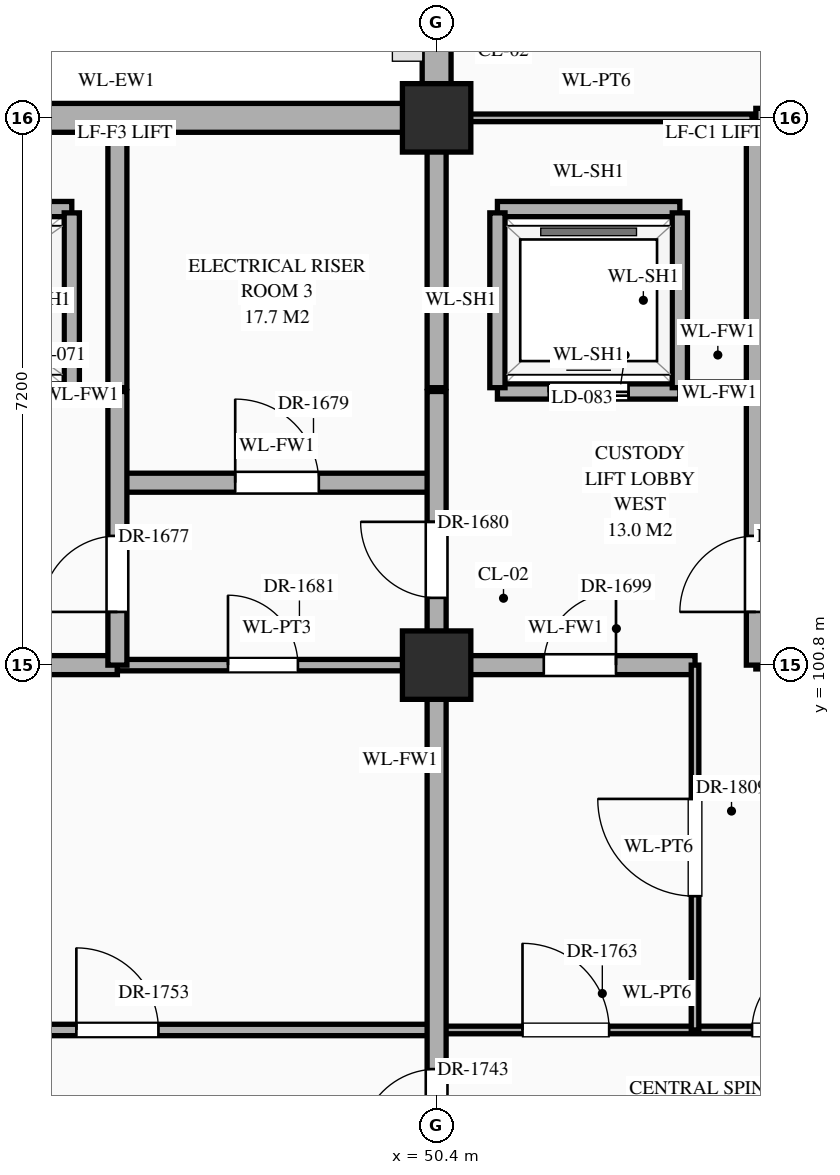
"""IFC4 building model, lengths in metres.
Left out: names, types, materials, properties, quantities, classifications, styles, units other than length and angle.
Written with IfcOpenShell. Run it as: python <this file> out.ifc"""

import sys

from ifc_helpers import new_model, si_unit, direction, frame, frame_2d, origin, origin_2d, place, context, subcontext, project, spatial, rectangle, extrude, element, fill, save


model = new_model("IFC4")
c1 = context("Model", 3, precision=1e-05, world=origin(), true_north=direction((0.0, 1.0)))
c2 = subcontext(c1, "Body", "Model", "MODEL_VIEW")
j1 = project(units=[si_unit("LENGTHUNIT", "METRE"), si_unit("PLANEANGLEUNIT", "RADIAN")], contexts=[c1])
p1 = place(None, origin())
s1 = spatial("IfcSite", under=j1, at=p1, CompositionType="ELEMENT")
p2 = place(p1, origin())
s2 = spatial("IfcBuilding", under=s1, at=p2, CompositionType="ELEMENT")
p3 = place(p2, frame((0.0, 0.0, 16.2)))
s3 = spatial("IfcBuildingStorey", under=s2, at=p3, CompositionType="ELEMENT", Elevation=16.2)
for number, where, z_axis, x_axis in (
    (1, (50.4, 100.8, 0.0), (0.0, 0.0, 1.0), (1.0, 0.0, 0.0)),
    (2, (50.4, 108.0, 0.0), (0.0, 0.0, 1.0), (1.0, 0.0, 0.0)),
):
    element("IfcColumn", number, at=place(p3, frame(where, z_axis=z_axis, x_axis=x_axis)), inside=s3, PredefinedType="COLUMN", context=c2, shape_type="SweptSolid", body=[
        extrude(rectangle(XDim=0.9, YDim=0.9, at=origin_2d()), origin(), (0.0, 0.0, 1.0), 5.4),
    ])
p4 = place(p3, frame((42.42, 108.0, 0.0), z_axis=(0.0, 0.0, 1.0), x_axis=(1.0, 0.0, 0.0)))
e3 = element("IfcWall", 3, at=p4, inside=s3, PredefinedType="STANDARD", context=c2, shape_type="SweptSolid", body=[
    extrude(rectangle(XDim=7.535, YDim=0.38, at=frame_2d((3.768, 0.0))), origin(), (0.0, 0.0, 1.0), 4.47),
])
p5 = place(p3, frame((50.4, 108.445, 0.0), z_axis=(0.0, 0.0, 1.0), x_axis=(0.0, 1.0, 0.0)))
e4 = element("IfcWall", 4, at=p5, inside=s3, PredefinedType="STANDARD", context=c2, shape_type="SweptSolid", body=[
    extrude(rectangle(XDim=6.335, YDim=0.38, at=frame_2d((3.167, 0.0))), origin(), (0.0, 0.0, 1.0), 4.47),
])
p6 = place(p5, frame((3.855, 0.0, 0.85)))
e5 = element("IfcOpeningElement", 5, at=p6, cuts=e4, PredefinedType="OPENING", context=c2, shape_type="SweptSolid", body=[
    extrude(rectangle(XDim=1.2, YDim=1.74, at=frame_2d((0.6, 0.87))), frame((0.0, 0.202, 0.0), z_axis=(0.0, -1.0, 0.0), x_axis=(1.0, 0.0, 0.0)), (0.0, 0.0, 1.0), 0.404),
])
p7 = place(p3, frame((31.0, 96.0, 0.0), z_axis=(0.0, 0.0, 1.0), x_axis=(1.0, 0.0, 0.0)))
e6 = element("IfcWall", 6, at=p7, inside=s3, PredefinedType="STANDARD", context=c2, shape_type="SweptSolid", body=[
    extrude(rectangle(XDim=19.4, YDim=0.15, at=frame_2d((9.7, 0.0))), origin(), (0.0, 0.0, 1.0), 5.12),
])
p8 = place(p7, frame((0.8, 0.0, 0.0)))
e7 = element("IfcOpeningElement", 7, at=p8, cuts=e6, PredefinedType="OPENING", context=c2, shape_type="SweptSolid", body=[
    extrude(rectangle(XDim=1.0, YDim=2.25, at=frame_2d((0.5, 1.125))), frame((0.0, 0.087, 0.0), z_axis=(0.0, -1.0, 0.0), x_axis=(1.0, 0.0, 0.0)), (0.0, 0.0, 1.0), 0.174),
])
p9 = place(p7, frame((6.28, 0.0, 0.0)))
e8 = element("IfcOpeningElement", 8, at=p9, cuts=e6, PredefinedType="OPENING", context=c2, shape_type="SweptSolid", body=[
    extrude(rectangle(XDim=1.04, YDim=2.2, at=frame_2d((0.52, 1.1))), frame((0.0, 0.087, 0.0), z_axis=(0.0, -1.0, 0.0), x_axis=(1.0, 0.0, 0.0)), (0.0, 0.0, 1.0), 0.174),
])
p10 = place(p7, frame((14.66, 0.0, 0.0)))
e9 = element("IfcOpeningElement", 9, at=p10, cuts=e6, PredefinedType="OPENING", context=c2, shape_type="SweptSolid", body=[
    extrude(rectangle(XDim=1.08, YDim=2.25, at=frame_2d((0.54, 1.125))), frame((0.0, 0.087, 0.0), z_axis=(0.0, -1.0, 0.0), x_axis=(1.0, 0.0, 0.0)), (0.0, 0.0, 1.0), 0.174),
])
p11 = place(p3, frame((50.4, 96.0, 0.0), z_axis=(0.0, 0.0, 1.0), x_axis=(1.0, 0.0, 0.0)))
e10 = element("IfcWall", 10, at=p11, inside=s3, PredefinedType="STANDARD", context=c2, shape_type="SweptSolid", body=[
    extrude(rectangle(XDim=5.8, YDim=0.1, at=frame_2d((2.9, 0.0))), origin(), (0.0, 0.0, 1.0), 5.12),
])
p12 = place(p11, frame((1.13, 0.0, 0.0)))
e11 = element("IfcOpeningElement", 11, at=p12, cuts=e10, PredefinedType="OPENING", context=c2, shape_type="SweptSolid", body=[
    extrude(rectangle(XDim=1.14, YDim=2.4, at=frame_2d((0.57, 1.2))), frame((0.0, 0.062, 0.0), z_axis=(0.0, -1.0, 0.0), x_axis=(1.0, 0.0, 0.0)), (0.0, 0.0, 1.0), 0.124),
])
p13 = place(p11, frame((4.15, 0.0, 0.0)))
e12 = element("IfcOpeningElement", 12, at=p13, cuts=e10, PredefinedType="OPENING", context=c2, shape_type="SweptSolid", body=[
    extrude(rectangle(XDim=0.9, YDim=2.15, at=frame_2d((0.45, 1.075))), frame((0.0, 0.062, 0.0), z_axis=(0.0, -1.0, 0.0), x_axis=(1.0, 0.0, 0.0)), (0.0, 0.0, 1.0), 0.124),
])
p14 = place(p3, frame((42.0, 100.8, 0.0), z_axis=(0.0, 0.0, 1.0), x_axis=(1.0, 0.0, 0.0)))
e13 = element("IfcWall", 13, at=p14, inside=s3, PredefinedType="STANDARD", context=c2, shape_type="SweptSolid", body=[
    extrude(rectangle(XDim=4.2, YDim=0.25, at=frame_2d((2.1, 0.0))), origin(), (0.0, 0.0, 1.0), 4.27),
])
p15 = place(p3, frame((46.2, 100.8, 0.0), z_axis=(0.0, 0.0, 1.0), x_axis=(1.0, 0.0, 0.0)))
e14 = element("IfcWall", 14, at=p15, inside=s3, PredefinedType="STANDARD", context=c2, shape_type="SweptSolid", body=[
    extrude(rectangle(XDim=4.2, YDim=0.15, at=frame_2d((2.1, 0.0))), origin(), (0.0, 0.0, 1.0), 4.27),
])
p16 = place(p15, frame((1.455, 0.0, 0.0)))
e15 = element("IfcOpeningElement", 15, at=p16, cuts=e14, PredefinedType="OPENING", context=c2, shape_type="SweptSolid", body=[
    extrude(rectangle(XDim=0.92, YDim=2.15, at=frame_2d((0.46, 1.075))), frame((0.0, 0.087, 0.0), z_axis=(0.0, -1.0, 0.0), x_axis=(1.0, 0.0, 0.0)), (0.0, 0.0, 1.0), 0.174),
])
p17 = place(p3, frame((50.4, 100.8, 0.0), z_axis=(0.0, 0.0, 1.0), x_axis=(1.0, 0.0, 0.0)))
e16 = element("IfcWall", 16, at=p17, inside=s3, PredefinedType="STANDARD", context=c2, shape_type="SweptSolid", body=[
    extrude(rectangle(XDim=3.4, YDim=0.25, at=frame_2d((1.7, 0.0))), origin(), (0.0, 0.0, 1.0), 4.27),
])
p18 = place(p17, frame((1.41, 0.0, 0.0)))
e17 = element("IfcOpeningElement", 17, at=p18, cuts=e16, PredefinedType="OPENING", context=c2, shape_type="SweptSolid", body=[
    extrude(rectangle(XDim=0.95, YDim=2.15, at=frame_2d((0.475, 1.075))), frame((0.0, 0.137, 0.0), z_axis=(0.0, -1.0, 0.0), x_axis=(1.0, 0.0, 0.0)), (0.0, 0.0, 1.0), 0.274),
])
p19 = place(p3, frame((54.6, 100.8, 0.0), z_axis=(0.0, 0.0, 1.0), x_axis=(1.0, 0.0, 0.0)))
e18 = element("IfcWall", 18, at=p19, inside=s3, PredefinedType="STANDARD", context=c2, shape_type="SweptSolid", body=[
    extrude(rectangle(XDim=1.6, YDim=0.1, at=frame_2d((0.8, 0.0))), origin(), (0.0, 0.0, 1.0), 4.27),
])
p20 = place(p19, frame((0.28, 0.0, 0.0)))
e19 = element("IfcOpeningElement", 19, at=p20, cuts=e18, PredefinedType="OPENING", context=c2, shape_type="SweptSolid", body=[
    extrude(rectangle(XDim=1.04, YDim=2.2, at=frame_2d((0.52, 1.1))), frame((0.0, 0.062, 0.0), z_axis=(0.0, -1.0, 0.0), x_axis=(1.0, 0.0, 0.0)), (0.0, 0.0, 1.0), 0.124),
])
p21 = place(p3, frame((46.2, 103.2, 0.0), z_axis=(0.0, 0.0, 1.0), x_axis=(1.0, 0.0, 0.0)))
e20 = element("IfcWall", 20, at=p21, inside=s3, PredefinedType="STANDARD", context=c2, shape_type="SweptSolid", body=[
    extrude(rectangle(XDim=4.2, YDim=0.25, at=frame_2d((2.1, 0.0))), origin(), (0.0, 0.0, 1.0), 5.12),
])
p22 = place(p21, frame((1.55, 0.0, 0.0)))
e21 = element("IfcOpeningElement", 21, at=p22, cuts=e20, PredefinedType="OPENING", context=c2, shape_type="SweptSolid", body=[
    extrude(rectangle(XDim=1.1, YDim=2.2, at=frame_2d((0.55, 1.1))), frame((0.0, 0.137, 0.0), z_axis=(0.0, -1.0, 0.0), x_axis=(1.0, 0.0, 0.0)), (0.0, 0.0, 1.0), 0.274),
])
p23 = place(p3, frame((54.6, 103.2, 0.0), z_axis=(0.0, 0.0, 1.0), x_axis=(1.0, 0.0, 0.0)))
e22 = element("IfcWall", 22, at=p23, inside=s3, PredefinedType="STANDARD", context=c2, shape_type="SweptSolid", body=[
    extrude(rectangle(XDim=4.2, YDim=0.25, at=frame_2d((2.1, 0.0))), origin(), (0.0, 0.0, 1.0), 5.12),
])
p24 = place(p23, frame((1.55, 0.0, 0.0)))
e23 = element("IfcOpeningElement", 23, at=p24, cuts=e22, PredefinedType="OPENING", context=c2, shape_type="SweptSolid", body=[
    extrude(rectangle(XDim=1.1, YDim=2.2, at=frame_2d((0.55, 1.1))), frame((0.0, 0.137, 0.0), z_axis=(0.0, -1.0, 0.0), x_axis=(1.0, 0.0, 0.0)), (0.0, 0.0, 1.0), 0.274),
])
p25 = place(p3, frame((42.6, 104.4, 0.0), z_axis=(0.0, 0.0, 1.0), x_axis=(1.0, 0.0, 0.0)))
e24 = element("IfcWall", 24, at=p25, inside=s3, PredefinedType="STANDARD", context=c2, shape_type="SweptSolid", body=[
    extrude(rectangle(XDim=3.0, YDim=0.2, at=frame_2d((1.5, 0.0))), origin(), (0.0, 0.0, 1.0), 5.12),
])
p26 = place(p25, frame((0.9, 0.0, 0.0)))
e25 = element("IfcOpeningElement", 25, at=p26, cuts=e24, PredefinedType="OPENING", context=c2, shape_type="SweptSolid", body=[
    extrude(rectangle(XDim=1.2, YDim=2.15, at=frame_2d((0.6, 1.075))), frame((0.0, 0.112, 0.0), z_axis=(0.0, -1.0, 0.0), x_axis=(1.0, 0.0, 0.0)), (0.0, 0.0, 1.0), 0.224),
])
p27 = place(p3, frame((51.2, 104.4, 0.0), z_axis=(0.0, 0.0, 1.0), x_axis=(1.0, 0.0, 0.0)))
e26 = element("IfcWall", 26, at=p27, inside=s3, PredefinedType="STANDARD", context=c2, shape_type="SweptSolid", body=[
    extrude(rectangle(XDim=2.4, YDim=0.2, at=frame_2d((1.2, 0.0))), origin(), (0.0, 0.0, 1.0), 5.12),
])
p28 = place(p27, frame((0.675, 0.0, 0.0)))
e27 = element("IfcOpeningElement", 27, at=p28, cuts=e26, PredefinedType="OPENING", context=c2, shape_type="SweptSolid", body=[
    extrude(rectangle(XDim=1.05, YDim=2.15, at=frame_2d((0.525, 1.075))), frame((0.0, 0.112, 0.0), z_axis=(0.0, -1.0, 0.0), x_axis=(1.0, 0.0, 0.0)), (0.0, 0.0, 1.0), 0.224),
])
p29 = place(p3, frame((53.65, 104.4, 0.0), z_axis=(0.0, 0.0, 1.0), x_axis=(1.0, 0.0, 0.0)))
e28 = element("IfcWall", 28, at=p29, inside=s3, PredefinedType="STANDARD", context=c2, shape_type="SweptSolid", body=[
    extrude(rectangle(XDim=0.9, YDim=0.25, at=frame_2d((0.45, 0.0))), origin(), (0.0, 0.0, 1.0), 5.12),
])
p30 = place(p3, frame((42.6, 106.8, 0.0), z_axis=(0.0, 0.0, 1.0), x_axis=(1.0, 0.0, 0.0)))
e29 = element("IfcWall", 29, at=p30, inside=s3, PredefinedType="STANDARD", context=c2, shape_type="SweptSolid", body=[
    extrude(rectangle(XDim=3.0, YDim=0.2, at=frame_2d((1.5, 0.0))), origin(), (0.0, 0.0, 1.0), 5.12),
])
p31 = place(p3, frame((51.2, 106.8, 0.0), z_axis=(0.0, 0.0, 1.0), x_axis=(1.0, 0.0, 0.0)))
e30 = element("IfcWall", 30, at=p31, inside=s3, PredefinedType="STANDARD", context=c2, shape_type="SweptSolid", body=[
    extrude(rectangle(XDim=2.4, YDim=0.2, at=frame_2d((1.2, 0.0))), origin(), (0.0, 0.0, 1.0), 5.12),
])
p32 = place(p3, frame((50.45, 108.0, 0.0), z_axis=(0.0, 0.0, 1.0), x_axis=(1.0, 0.0, 0.0)))
e31 = element("IfcWall", 31, at=p32, inside=s3, PredefinedType="STANDARD", context=c2, shape_type="SweptSolid", body=[
    extrude(rectangle(XDim=4.1, YDim=0.1, at=frame_2d((2.05, 0.0))), origin(), (0.0, 0.0, 1.0), 4.27),
])
p33 = place(p3, frame((54.6, 108.0, 0.0), z_axis=(0.0, 0.0, 1.0), x_axis=(1.0, 0.0, 0.0)))
e32 = element("IfcWall", 32, at=p33, inside=s3, PredefinedType="STANDARD", context=c2, shape_type="SweptSolid", body=[
    extrude(rectangle(XDim=4.2, YDim=0.25, at=frame_2d((2.1, 0.0))), origin(), (0.0, 0.0, 1.0), 4.27),
])
p34 = place(p33, frame((1.365, 0.0, 0.0)))
e33 = element("IfcOpeningElement", 33, at=p34, cuts=e32, PredefinedType="OPENING", context=c2, shape_type="SweptSolid", body=[
    extrude(rectangle(XDim=1.1, YDim=2.2, at=frame_2d((0.55, 1.1))), frame((0.0, 0.137, 0.0), z_axis=(0.0, -1.0, 0.0), x_axis=(1.0, 0.0, 0.0)), (0.0, 0.0, 1.0), 0.274),
])
p35 = place(p3, frame((45.6, 104.45, 0.0), z_axis=(0.0, 0.0, 1.0), x_axis=(0.0, 1.0, 0.0)))
e34 = element("IfcWall", 34, at=p35, inside=s3, PredefinedType="STANDARD", context=c2, shape_type="SweptSolid", body=[
    extrude(rectangle(XDim=2.3, YDim=0.2, at=frame_2d((1.15, 0.0))), origin(), (0.0, 0.0, 1.0), 5.12),
])
p36 = place(p3, frame((46.2, 100.8, 0.0), z_axis=(0.0, 0.0, 1.0), x_axis=(0.0, 1.0, 0.0)))
e35 = element("IfcWall", 35, at=p36, inside=s3, PredefinedType="STANDARD", context=c2, shape_type="SweptSolid", body=[
    extrude(rectangle(XDim=3.6, YDim=0.25, at=frame_2d((1.8, 0.0))), origin(), (0.0, 0.0, 1.0), 4.72),
])
p37 = place(p36, frame((0.7, 0.0, 0.0)))
e36 = element("IfcOpeningElement", 36, at=p37, cuts=e35, PredefinedType="OPENING", context=c2, shape_type="SweptSolid", body=[
    extrude(rectangle(XDim=1.0, YDim=2.2, at=frame_2d((0.5, 1.1))), frame((0.0, 0.137, 0.0), z_axis=(0.0, -1.0, 0.0), x_axis=(1.0, 0.0, 0.0)), (0.0, 0.0, 1.0), 0.274),
])
p38 = place(p3, frame((46.2, 104.45, 0.0), z_axis=(0.0, 0.0, 1.0), x_axis=(0.0, 1.0, 0.0)))
e37 = element("IfcWall", 37, at=p38, inside=s3, PredefinedType="STANDARD", context=c2, shape_type="SweptSolid", body=[
    extrude(rectangle(XDim=3.46, YDim=0.25, at=frame_2d((1.73, 0.0))), origin(), (0.0, 0.0, 1.0), 4.72),
])
p39 = place(p3, frame((50.4, 91.2, 0.0), z_axis=(0.0, 0.0, 1.0), x_axis=(0.0, 1.0, 0.0)))
e38 = element("IfcWall", 38, at=p39, inside=s3, PredefinedType="STANDARD", context=c2, shape_type="SweptSolid", body=[
    extrude(rectangle(XDim=13.2, YDim=0.25, at=frame_2d((6.6, 0.0))), origin(), (0.0, 0.0, 1.0), 4.37),
])
p40 = place(p39, frame((0.515, 0.0, 0.0)))
e39 = element("IfcOpeningElement", 39, at=p40, cuts=e38, PredefinedType="OPENING", context=c2, shape_type="SweptSolid", body=[
    extrude(rectangle(XDim=1.0, YDim=2.2, at=frame_2d((0.5, 1.1))), frame((0.0, 0.137, 0.0), z_axis=(0.0, -1.0, 0.0), x_axis=(1.0, 0.0, 0.0)), (0.0, 0.0, 1.0), 0.274),
])
p41 = place(p39, frame((10.485, 0.0, 0.0)))
e40 = element("IfcOpeningElement", 40, at=p41, cuts=e38, PredefinedType="OPENING", context=c2, shape_type="SweptSolid", body=[
    extrude(rectangle(XDim=1.0, YDim=2.2, at=frame_2d((0.5, 1.1))), frame((0.0, 0.137, 0.0), z_axis=(0.0, -1.0, 0.0), x_axis=(1.0, 0.0, 0.0)), (0.0, 0.0, 1.0), 0.274),
])
p42 = place(p39, frame((3.285, 0.0, 0.0)))
e41 = element("IfcOpeningElement", 41, at=p42, cuts=e38, PredefinedType="OPENING", context=c2, shape_type="SweptSolid", body=[
    extrude(rectangle(XDim=1.0, YDim=2.2, at=frame_2d((0.5, 1.1))), frame((0.0, 0.137, 0.0), z_axis=(0.0, -1.0, 0.0), x_axis=(1.0, 0.0, 0.0)), (0.0, 0.0, 1.0), 0.274),
])
p43 = place(p3, frame((50.4, 104.45, 0.0), z_axis=(0.0, 0.0, 1.0), x_axis=(0.0, 1.0, 0.0)))
e42 = element("IfcWall", 42, at=p43, inside=s3, PredefinedType="STANDARD", context=c2, shape_type="SweptSolid", body=[
    extrude(rectangle(XDim=3.46, YDim=0.25, at=frame_2d((1.73, 0.0))), origin(), (0.0, 0.0, 1.0), 4.37),
])
for number, where, z_axis, x_axis in (
    (43, (51.2, 104.45, 0.0), (0.0, 0.0, 1.0), (0.0, 1.0, 0.0)),
    (44, (53.6, 104.45, 0.0), (0.0, 0.0, 1.0), (0.0, 1.0, 0.0)),
):
    element("IfcWall", number, at=place(p3, frame(where, z_axis=z_axis, x_axis=x_axis)), inside=s3, PredefinedType="STANDARD", context=c2, shape_type="SweptSolid", body=[
        extrude(rectangle(XDim=2.3, YDim=0.2, at=frame_2d((1.15, 0.0))), origin(), (0.0, 0.0, 1.0), 5.12),
    ])
p44 = place(p3, frame((53.8, 96.0, 0.0), z_axis=(0.0, 0.0, 1.0), x_axis=(0.0, 1.0, 0.0)))
e45 = element("IfcWall", 45, at=p44, inside=s3, PredefinedType="STANDARD", context=c2, shape_type="SweptSolid", body=[
    extrude(rectangle(XDim=4.8, YDim=0.1, at=frame_2d((2.4, 0.0))), origin(), (0.0, 0.0, 1.0), 5.12),
])
p45 = place(p44, frame((1.76, 0.0, 0.0)))
e46 = element("IfcOpeningElement", 46, at=p45, cuts=e45, PredefinedType="OPENING", context=c2, shape_type="SweptSolid", body=[
    extrude(rectangle(XDim=1.28, YDim=2.35, at=frame_2d((0.64, 1.175))), frame((0.0, 0.062, 0.0), z_axis=(0.0, -1.0, 0.0), x_axis=(1.0, 0.0, 0.0)), (0.0, 0.0, 1.0), 0.124),
])
p46 = place(p3, frame((54.6, 100.8, 0.0), z_axis=(0.0, 0.0, 1.0), x_axis=(0.0, 1.0, 0.0)))
e47 = element("IfcWall", 47, at=p46, inside=s3, PredefinedType="STANDARD", context=c2, shape_type="SweptSolid", body=[
    extrude(rectangle(XDim=3.6, YDim=0.25, at=frame_2d((1.8, 0.0))), origin(), (0.0, 0.0, 1.0), 4.57),
])
p47 = place(p46, frame((0.7, 0.0, 0.0)))
e48 = element("IfcOpeningElement", 48, at=p47, cuts=e47, PredefinedType="OPENING", context=c2, shape_type="SweptSolid", body=[
    extrude(rectangle(XDim=1.0, YDim=2.2, at=frame_2d((0.5, 1.1))), frame((0.0, 0.137, 0.0), z_axis=(0.0, -1.0, 0.0), x_axis=(1.0, 0.0, 0.0)), (0.0, 0.0, 1.0), 0.274),
])
p48 = place(p3, frame((54.6, 104.45, 0.0), z_axis=(0.0, 0.0, 1.0), x_axis=(0.0, 1.0, 0.0)))
e49 = element("IfcWall", 49, at=p48, inside=s3, PredefinedType="STANDARD", context=c2, shape_type="SweptSolid", body=[
    extrude(rectangle(XDim=3.5, YDim=0.25, at=frame_2d((1.75, 0.0))), origin(), (0.0, 0.0, 1.0), 4.57),
])
p49 = place(p28, origin())
e50 = element("IfcDoor", 50, at=p49, inside=s3, OperationType="DOUBLE_DOOR_SLIDING", PredefinedType="DOOR", context=c2, shape_type="SweptSolid", body=[
    extrude(rectangle(XDim=1.05, YDim=2.15, at=frame_2d((0.525, 1.075))), frame((0.0, 0.025, 0.0), z_axis=(0.0, -1.0, 0.0), x_axis=(1.0, 0.0, 0.0)), (0.0, 0.0, 1.0), 0.05),
])
fill(e27, e50)
p50 = place(p37, origin())
e51 = element("IfcDoor", 51, at=p50, inside=s3, OperationType="SINGLE_SWING_LEFT", PredefinedType="DOOR", context=c2, shape_type="SweptSolid", body=[
    extrude(rectangle(XDim=1.0, YDim=2.2, at=frame_2d((0.5, 1.1))), frame((0.0, 0.025, 0.0), z_axis=(0.0, -1.0, 0.0), x_axis=(1.0, 0.0, 0.0)), (0.0, 0.0, 1.0), 0.05),
])
fill(e36, e51)
p51 = place(p22, origin())
e52 = element("IfcDoor", 52, at=p51, inside=s3, OperationType="SINGLE_SWING_LEFT", PredefinedType="DOOR", context=c2, shape_type="SweptSolid", body=[
    extrude(rectangle(XDim=1.1, YDim=2.2, at=frame_2d((0.55, 1.1))), frame((0.0, 0.025, 0.0), z_axis=(0.0, -1.0, 0.0), x_axis=(1.0, 0.0, 0.0)), (0.0, 0.0, 1.0), 0.05),
])
fill(e21, e52)
p52 = place(p41, origin())
e53 = element("IfcDoor", 53, at=p52, inside=s3, OperationType="SINGLE_SWING_RIGHT", PredefinedType="DOOR", context=c2, shape_type="SweptSolid", body=[
    extrude(rectangle(XDim=1.0, YDim=2.2, at=frame_2d((0.5, 1.1))), frame((0.0, 0.025, 0.0), z_axis=(0.0, -1.0, 0.0), x_axis=(1.0, 0.0, 0.0)), (0.0, 0.0, 1.0), 0.05),
])
fill(e40, e53)
p53 = place(p16, origin())
e54 = element("IfcDoor", 54, at=p53, inside=s3, OperationType="SINGLE_SWING_LEFT", PredefinedType="DOOR", context=c2, shape_type="SweptSolid", body=[
    extrude(rectangle(XDim=0.92, YDim=2.15, at=frame_2d((0.46, 1.075))), frame((0.0, 0.025, 0.0), z_axis=(0.0, -1.0, 0.0), x_axis=(1.0, 0.0, 0.0)), (0.0, 0.0, 1.0), 0.05),
])
fill(e15, e54)
p54 = place(p47, origin())
e55 = element("IfcDoor", 55, at=p54, inside=s3, OperationType="SINGLE_SWING_LEFT", PredefinedType="DOOR", context=c2, shape_type="SweptSolid", body=[
    extrude(rectangle(XDim=1.0, YDim=2.2, at=frame_2d((0.5, 1.1))), frame((0.0, 0.025, 0.0), z_axis=(0.0, -1.0, 0.0), x_axis=(1.0, 0.0, 0.0)), (0.0, 0.0, 1.0), 0.05),
])
fill(e48, e55)
p55 = place(p18, origin())
e56 = element("IfcDoor", 56, at=p55, inside=s3, OperationType="SINGLE_SWING_RIGHT", PredefinedType="DOOR", context=c2, shape_type="SweptSolid", body=[
    extrude(rectangle(XDim=0.95, YDim=2.15, at=frame_2d((0.475, 1.075))), frame((0.0, 0.025, 0.0), z_axis=(0.0, -1.0, 0.0), x_axis=(1.0, 0.0, 0.0)), (0.0, 0.0, 1.0), 0.05),
])
fill(e17, e56)
p56 = place(p42, origin())
e57 = element("IfcDoor", 57, at=p56, inside=s3, OperationType="SINGLE_SWING_LEFT", PredefinedType="DOOR", context=c2, shape_type="SweptSolid", body=[
    extrude(rectangle(XDim=1.0, YDim=2.2, at=frame_2d((0.5, 1.1))), frame((0.0, 0.025, 0.0), z_axis=(0.0, -1.0, 0.0), x_axis=(1.0, 0.0, 0.0)), (0.0, 0.0, 1.0), 0.05),
])
fill(e41, e57)
p57 = place(p10, origin())
e58 = element("IfcDoor", 58, at=p57, inside=s3, OperationType="SINGLE_SWING_LEFT", PredefinedType="DOOR", context=c2, shape_type="SweptSolid", body=[
    extrude(rectangle(XDim=1.08, YDim=2.25, at=frame_2d((0.54, 1.125))), frame((0.0, 0.025, 0.0), z_axis=(0.0, -1.0, 0.0), x_axis=(1.0, 0.0, 0.0)), (0.0, 0.0, 1.0), 0.05),
])
fill(e9, e58)
p58 = place(p12, origin())
e59 = element("IfcDoor", 59, at=p58, inside=s3, OperationType="SINGLE_SWING_LEFT", PredefinedType="DOOR", context=c2, shape_type="SweptSolid", body=[
    extrude(rectangle(XDim=1.14, YDim=2.4, at=frame_2d((0.57, 1.2))), frame((0.0, 0.025, 0.0), z_axis=(0.0, -1.0, 0.0), x_axis=(1.0, 0.0, 0.0)), (0.0, 0.0, 1.0), 0.05),
])
fill(e11, e59)
p59 = place(p13, origin())
e60 = element("IfcDoor", 60, at=p59, inside=s3, OperationType="SINGLE_SWING_RIGHT", PredefinedType="DOOR", context=c2, shape_type="SweptSolid", body=[
    extrude(rectangle(XDim=0.9, YDim=2.15, at=frame_2d((0.45, 1.075))), frame((0.0, 0.025, 0.0), z_axis=(0.0, -1.0, 0.0), x_axis=(1.0, 0.0, 0.0)), (0.0, 0.0, 1.0), 0.05),
])
fill(e12, e60)
p60 = place(p45, origin())
e61 = element("IfcDoor", 61, at=p60, inside=s3, OperationType="SINGLE_SWING_RIGHT", PredefinedType="DOOR", context=c2, shape_type="SweptSolid", body=[
    extrude(rectangle(XDim=1.28, YDim=2.35, at=frame_2d((0.64, 1.175))), frame((0.0, 0.025, 0.0), z_axis=(0.0, -1.0, 0.0), x_axis=(1.0, 0.0, 0.0)), (0.0, 0.0, 1.0), 0.05),
])
fill(e46, e61)
save(model, sys.argv[1])
